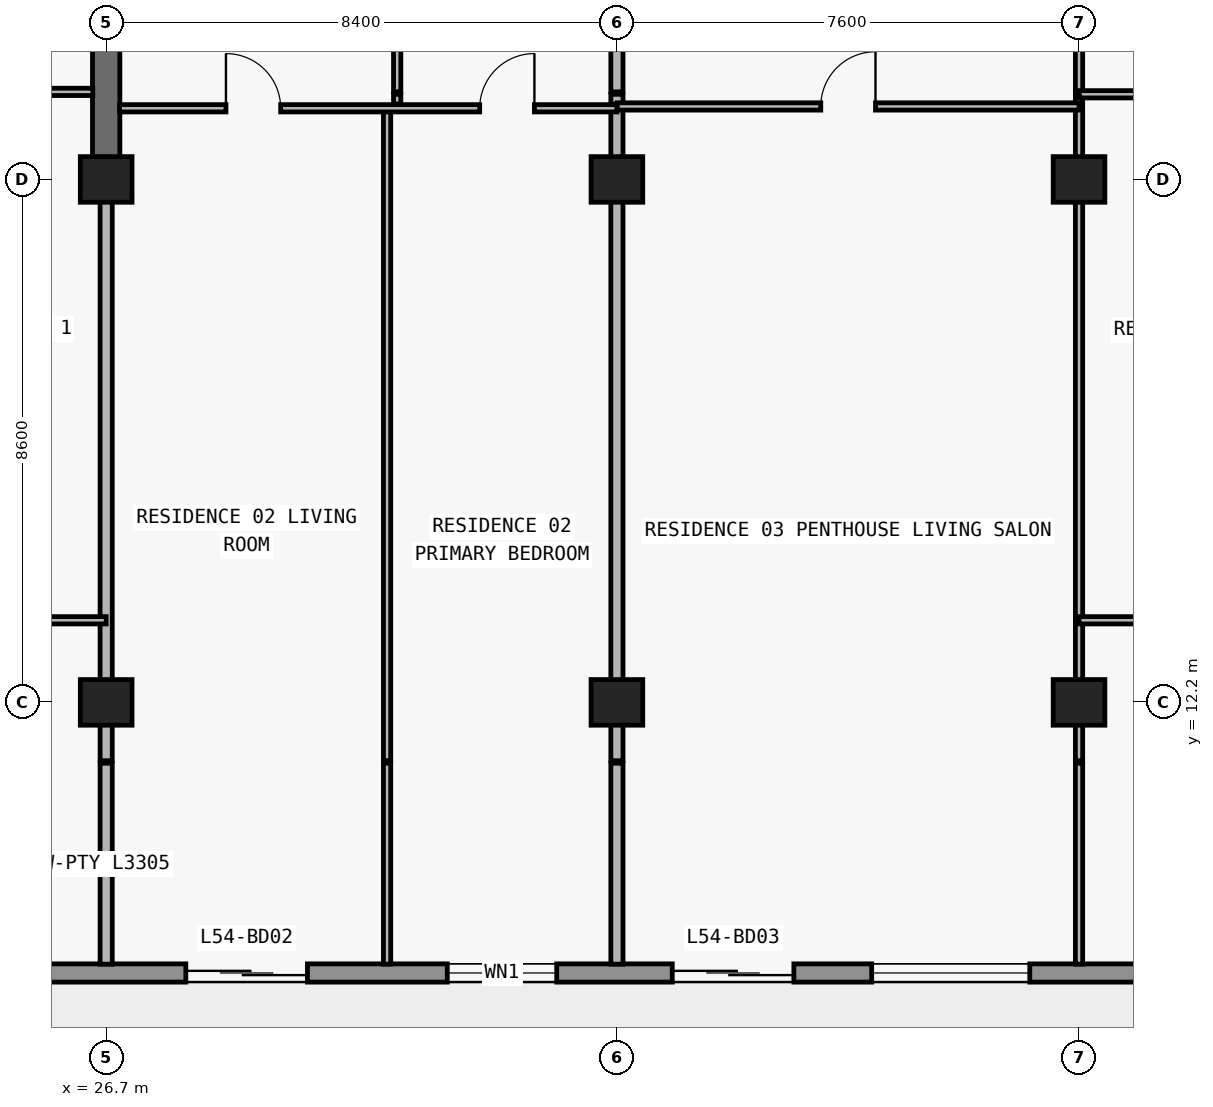
"""IFC4 building model, lengths in metres.
Left out: names, types, materials, properties, quantities, classifications, styles, units other than length and angle.
Written with IfcOpenShell. Run it as: python <this file> out.ifc"""

import sys

from ifc_helpers import new_model, si_unit, direction, frame, frame_2d, origin, origin_2d, place, context, subcontext, project, spatial, rectangle, extrude, element, fill, save


model = new_model("IFC4")
c1 = context("Model", 3, precision=1e-05, world=origin(), true_north=direction((0.0, 1.0)))
c2 = subcontext(c1, "Body", "Model", "MODEL_VIEW")
j1 = project(units=[si_unit("LENGTHUNIT", "METRE"), si_unit("PLANEANGLEUNIT", "RADIAN")], contexts=[c1])
p1 = place(None, origin())
s1 = spatial("IfcSite", under=j1, at=p1, CompositionType="ELEMENT")
p2 = place(p1, origin())
s2 = spatial("IfcBuilding", under=s1, at=p2, CompositionType="ELEMENT")
p3 = place(p2, frame((0.0, 0.0, 195.0)))
s3 = spatial("IfcBuildingStorey", under=s2, at=p3, CompositionType="ELEMENT", Elevation=195.0)
for number, where, z_axis, x_axis in (
    (1, (26.7, 12.2, 0.0), (0.0, 0.0, 1.0), (1.0, 0.0, 0.0)),
    (2, (35.1, 12.2, 0.0), (0.0, 0.0, 1.0), (1.0, 0.0, 0.0)),
    (3, (42.7, 12.2, 0.0), (0.0, 0.0, 1.0), (1.0, 0.0, 0.0)),
    (4, (26.7, 20.8, 0.0), (0.0, 0.0, 1.0), (1.0, 0.0, 0.0)),
    (5, (35.1, 20.8, 0.0), (0.0, 0.0, 1.0), (1.0, 0.0, 0.0)),
    (6, (42.7, 20.8, 0.0), (0.0, 0.0, 1.0), (1.0, 0.0, 0.0)),
):
    element("IfcColumn", number, at=place(p3, frame(where, z_axis=z_axis, x_axis=x_axis)), inside=s3, PredefinedType="COLUMN", context=c2, shape_type="SweptSolid", body=[
        extrude(rectangle(XDim=0.85, YDim=0.75, at=origin_2d()), origin(), (0.0, 0.0, 1.0), 3.05),
    ])
p4 = place(p3, frame((26.7, 20.8, 0.0), z_axis=(0.0, 0.0, 1.0), x_axis=(0.0, 1.0, 0.0)))
e7 = element("IfcWall", 7, at=p4, inside=s3, PredefinedType="SHEAR", context=c2, shape_type="SweptSolid", body=[
    extrude(rectangle(XDim=8.6, YDim=0.45, at=frame_2d((4.3, 0.0))), origin(), (0.0, 0.0, 1.0), 3.05),
])
p5 = place(p3, frame((67.7, 7.75, 0.0), z_axis=(0.0, 0.0, 1.0), x_axis=(-1.0, 0.0, 0.0)))
e8 = element("IfcWall", 8, at=p5, inside=s3, PredefinedType="STANDARD", context=c2, shape_type="SweptSolid", body=[
    extrude(rectangle(XDim=57.6, YDim=0.3, at=frame_2d((28.8, 0.0))), origin(), (0.0, 0.0, 1.0), 3.05),
])
p6 = place(p5, frame((54.69, 0.0, 0.0)))
e9 = element("IfcOpeningElement", 9, at=p6, cuts=e8, PredefinedType="OPENING", context=c2, shape_type="SweptSolid", body=[
    extrude(rectangle(XDim=2.0, YDim=2.3, at=frame_2d((1.0, 1.15))), frame((0.0, 0.16, 0.0), z_axis=(0.0, -1.0, 0.0), x_axis=(1.0, 0.0, 0.0)), (0.0, 0.0, 1.0), 0.32),
])
p7 = place(p5, frame((50.21, 0.0, 0.65)))
e10 = element("IfcOpeningElement", 10, at=p7, cuts=e8, PredefinedType="OPENING", context=c2, shape_type="SweptSolid", body=[
    extrude(rectangle(XDim=2.6, YDim=1.85, at=frame_2d((1.3, 0.925))), frame((0.0, 0.16, 0.0), z_axis=(0.0, -1.0, 0.0), x_axis=(1.0, 0.0, 0.0)), (0.0, 0.0, 1.0), 0.32),
])
p8 = place(p5, frame((44.1, 0.0, 0.85)))
e11 = element("IfcOpeningElement", 11, at=p8, cuts=e8, PredefinedType="OPENING", context=c2, shape_type="SweptSolid", body=[
    extrude(rectangle(XDim=2.2, YDim=1.55, at=frame_2d((1.1, 0.775))), frame((0.0, 0.16, 0.0), z_axis=(0.0, -1.0, 0.0), x_axis=(1.0, 0.0, 0.0)), (0.0, 0.0, 1.0), 0.32),
])
p9 = place(p5, frame((37.69, 0.0, 0.0)))
e12 = element("IfcOpeningElement", 12, at=p9, cuts=e8, PredefinedType="OPENING", context=c2, shape_type="SweptSolid", body=[
    extrude(rectangle(XDim=2.0, YDim=2.3, at=frame_2d((1.0, 1.15))), frame((0.0, 0.16, 0.0), z_axis=(0.0, -1.0, 0.0), x_axis=(1.0, 0.0, 0.0)), (0.0, 0.0, 1.0), 0.32),
])
p10 = place(p5, frame((33.59, 0.0, 0.85)))
e13 = element("IfcOpeningElement", 13, at=p10, cuts=e8, PredefinedType="OPENING", context=c2, shape_type="SweptSolid", body=[
    extrude(rectangle(XDim=1.8, YDim=1.55, at=frame_2d((0.9, 0.775))), frame((0.0, 0.16, 0.0), z_axis=(0.0, -1.0, 0.0), x_axis=(1.0, 0.0, 0.0)), (0.0, 0.0, 1.0), 0.32),
])
p11 = place(p5, frame((29.69, 0.0, 0.0)))
e14 = element("IfcOpeningElement", 14, at=p11, cuts=e8, PredefinedType="OPENING", context=c2, shape_type="SweptSolid", body=[
    extrude(rectangle(XDim=2.0, YDim=2.3, at=frame_2d((1.0, 1.15))), frame((0.0, 0.16, 0.0), z_axis=(0.0, -1.0, 0.0), x_axis=(1.0, 0.0, 0.0)), (0.0, 0.0, 1.0), 0.32),
])
p12 = place(p5, frame((25.81, 0.0, 0.65)))
e15 = element("IfcOpeningElement", 15, at=p12, cuts=e8, PredefinedType="OPENING", context=c2, shape_type="SweptSolid", body=[
    extrude(rectangle(XDim=2.6, YDim=1.85, at=frame_2d((1.3, 0.925))), frame((0.0, 0.16, 0.0), z_axis=(0.0, -1.0, 0.0), x_axis=(1.0, 0.0, 0.0)), (0.0, 0.0, 1.0), 0.32),
])
p13 = place(p5, frame((19.7, 0.0, 0.85)))
e16 = element("IfcOpeningElement", 16, at=p13, cuts=e8, PredefinedType="OPENING", context=c2, shape_type="SweptSolid", body=[
    extrude(rectangle(XDim=2.2, YDim=1.55, at=frame_2d((1.1, 0.775))), frame((0.0, 0.16, 0.0), z_axis=(0.0, -1.0, 0.0), x_axis=(1.0, 0.0, 0.0)), (0.0, 0.0, 1.0), 0.32),
])
p14 = place(p5, frame((13.29, 0.0, 0.0)))
e17 = element("IfcOpeningElement", 17, at=p14, cuts=e8, PredefinedType="OPENING", context=c2, shape_type="SweptSolid", body=[
    extrude(rectangle(XDim=2.0, YDim=2.3, at=frame_2d((1.0, 1.15))), frame((0.0, 0.16, 0.0), z_axis=(0.0, -1.0, 0.0), x_axis=(1.0, 0.0, 0.0)), (0.0, 0.0, 1.0), 0.32),
])
p15 = place(p5, frame((9.19, 0.0, 0.85)))
e18 = element("IfcOpeningElement", 18, at=p15, cuts=e8, PredefinedType="OPENING", context=c2, shape_type="SweptSolid", body=[
    extrude(rectangle(XDim=1.8, YDim=1.55, at=frame_2d((0.9, 0.775))), frame((0.0, 0.16, 0.0), z_axis=(0.0, -1.0, 0.0), x_axis=(1.0, 0.0, 0.0)), (0.0, 0.0, 1.0), 0.32),
])
p16 = place(p5, frame((5.273, 0.0, 0.0)))
e19 = element("IfcOpeningElement", 19, at=p16, cuts=e8, PredefinedType="OPENING", context=c2, shape_type="SweptSolid", body=[
    extrude(rectangle(XDim=2.0, YDim=2.3, at=frame_2d((1.0, 1.15))), frame((0.0, 0.16, 0.0), z_axis=(0.0, -1.0, 0.0), x_axis=(1.0, 0.0, 0.0)), (0.0, 0.0, 1.0), 0.32),
])
p17 = place(p5, frame((1.073, 0.0, 0.85)))
e20 = element("IfcOpeningElement", 20, at=p17, cuts=e8, PredefinedType="OPENING", context=c2, shape_type="SweptSolid", body=[
    extrude(rectangle(XDim=2.2, YDim=1.55, at=frame_2d((1.1, 0.775))), frame((0.0, 0.16, 0.0), z_axis=(0.0, -1.0, 0.0), x_axis=(1.0, 0.0, 0.0)), (0.0, 0.0, 1.0), 0.32),
])
p18 = place(p3, frame((26.7, 7.895, 0.0), z_axis=(0.0, 0.0, 1.0), x_axis=(0.0, 1.0, 0.0)))
e21 = element("IfcWall", 21, at=p18, inside=s3, PredefinedType="PARTITIONING", context=c2, shape_type="SweptSolid", body=[
    extrude(rectangle(XDim=3.305, YDim=0.2, at=frame_2d((1.652, 0.0))), origin(), (0.0, 0.0, 1.0), 3.05),
])
p19 = place(p3, frame((26.7, 11.24, 0.0), z_axis=(0.0, 0.0, 1.0), x_axis=(0.0, 1.0, 0.0)))
e22 = element("IfcWall", 22, at=p19, inside=s3, PredefinedType="PARTITIONING", context=c2, shape_type="SweptSolid", body=[
    extrude(rectangle(XDim=9.555, YDim=0.2, at=frame_2d((4.777, 0.0))), origin(), (0.0, 0.0, 1.0), 2.263),
])
p20 = place(p3, frame((31.32, 7.895, 0.0), z_axis=(0.0, 0.0, 1.0), x_axis=(0.0, 1.0, 0.0)))
e23 = element("IfcWall", 23, at=p20, inside=s3, PredefinedType="PARTITIONING", context=c2, shape_type="SweptSolid", body=[
    extrude(rectangle(XDim=3.305, YDim=0.12, at=frame_2d((1.652, 0.0))), origin(), (0.0, 0.0, 1.0), 3.05),
])
p21 = place(p3, frame((31.32, 11.24, 0.0), z_axis=(0.0, 0.0, 1.0), x_axis=(0.0, 1.0, 0.0)))
e24 = element("IfcWall", 24, at=p21, inside=s3, PredefinedType="PARTITIONING", context=c2, shape_type="SweptSolid", body=[
    extrude(rectangle(XDim=10.73, YDim=0.12, at=frame_2d((5.365, 0.0))), origin(), (0.0, 0.0, 1.0), 3.05),
])
p22 = place(p3, frame((31.486, 22.04, 0.0), z_axis=(0.0, 0.0, 1.0), x_axis=(0.0, 1.0, 0.0)))
e25 = element("IfcWall", 25, at=p22, inside=s3, PredefinedType="PARTITIONING", context=c2, shape_type="SweptSolid", body=[
    extrude(rectangle(XDim=0.16, YDim=0.12, at=frame_2d((0.08, 0.0))), origin(), (0.0, 0.0, 1.0), 3.05),
])
p23 = place(p3, frame((31.486, 22.24, 0.0), z_axis=(0.0, 0.0, 1.0), x_axis=(0.0, 1.0, 0.0)))
e26 = element("IfcWall", 26, at=p23, inside=s3, PredefinedType="PARTITIONING", context=c2, shape_type="SweptSolid", body=[
    extrude(rectangle(XDim=4.36, YDim=0.12, at=frame_2d((2.18, 0.0))), origin(), (0.0, 0.0, 1.0), 3.05),
])
p24 = place(p23, frame((1.73, 0.0, 0.0)))
e27 = element("IfcOpeningElement", 27, at=p24, cuts=e26, PredefinedType="OPENING", context=c2, shape_type="SweptSolid", body=[
    extrude(rectangle(XDim=0.9, YDim=2.15, at=frame_2d((0.45, 1.075))), frame((0.0, 0.07, 0.0), z_axis=(0.0, -1.0, 0.0), x_axis=(1.0, 0.0, 0.0)), (0.0, 0.0, 1.0), 0.14),
])
p25 = place(p3, frame((35.1, 7.895, 0.0), z_axis=(0.0, 0.0, 1.0), x_axis=(0.0, 1.0, 0.0)))
e28 = element("IfcWall", 28, at=p25, inside=s3, PredefinedType="PARTITIONING", context=c2, shape_type="SweptSolid", body=[
    extrude(rectangle(XDim=3.305, YDim=0.2, at=frame_2d((1.652, 0.0))), origin(), (0.0, 0.0, 1.0), 3.05),
])
p26 = place(p3, frame((35.1, 11.24, 0.0), z_axis=(0.0, 0.0, 1.0), x_axis=(0.0, 1.0, 0.0)))
e29 = element("IfcWall", 29, at=p26, inside=s3, PredefinedType="PARTITIONING", context=c2, shape_type="SweptSolid", body=[
    extrude(rectangle(XDim=10.73, YDim=0.2, at=frame_2d((5.365, 0.0))), origin(), (0.0, 0.0, 1.0), 2.263),
])
p27 = place(p3, frame((35.1, 22.04, 0.0), z_axis=(0.0, 0.0, 1.0), x_axis=(0.0, 1.0, 0.0)))
e30 = element("IfcWall", 30, at=p27, inside=s3, PredefinedType="PARTITIONING", context=c2, shape_type="SweptSolid", body=[
    extrude(rectangle(XDim=0.16, YDim=0.2, at=frame_2d((0.08, 0.0))), origin(), (0.0, 0.0, 1.0), 2.263),
])
p28 = place(p3, frame((35.1, 22.24, 0.0), z_axis=(0.0, 0.0, 1.0), x_axis=(0.0, 1.0, 0.0)))
e31 = element("IfcWall", 31, at=p28, inside=s3, PredefinedType="PARTITIONING", context=c2, shape_type="SweptSolid", body=[
    extrude(rectangle(XDim=4.36, YDim=0.2, at=frame_2d((2.18, 0.0))), origin(), (0.0, 0.0, 1.0), 2.263),
])
p29 = place(p3, frame((42.7, 7.895, 0.0), z_axis=(0.0, 0.0, 1.0), x_axis=(0.0, 1.0, 0.0)))
e32 = element("IfcWall", 32, at=p29, inside=s3, PredefinedType="PARTITIONING", context=c2, shape_type="SweptSolid", body=[
    extrude(rectangle(XDim=3.305, YDim=0.12, at=frame_2d((1.652, 0.0))), origin(), (0.0, 0.0, 1.0), 3.05),
])
p30 = place(p3, frame((42.7, 11.24, 0.0), z_axis=(0.0, 0.0, 1.0), x_axis=(0.0, 1.0, 0.0)))
e33 = element("IfcWall", 33, at=p30, inside=s3, PredefinedType="PARTITIONING", context=c2, shape_type="SweptSolid", body=[
    extrude(rectangle(XDim=10.73, YDim=0.12, at=frame_2d((5.365, 0.0))), origin(), (0.0, 0.0, 1.0), 2.263),
])
p31 = place(p3, frame((42.7, 22.04, 0.0), z_axis=(0.0, 0.0, 1.0), x_axis=(0.0, 1.0, 0.0)))
e34 = element("IfcWall", 34, at=p31, inside=s3, PredefinedType="PARTITIONING", context=c2, shape_type="SweptSolid", body=[
    extrude(rectangle(XDim=0.16, YDim=0.12, at=frame_2d((0.08, 0.0))), origin(), (0.0, 0.0, 1.0), 2.263),
])
p32 = place(p3, frame((42.7, 22.24, 0.0), z_axis=(0.0, 0.0, 1.0), x_axis=(0.0, 1.0, 0.0)))
e35 = element("IfcWall", 35, at=p32, inside=s3, PredefinedType="PARTITIONING", context=c2, shape_type="SweptSolid", body=[
    extrude(rectangle(XDim=4.36, YDim=0.12, at=frame_2d((2.18, 0.0))), origin(), (0.0, 0.0, 1.0), 2.263),
])
p33 = place(p32, frame((1.73, 0.0, 0.0)))
e36 = element("IfcOpeningElement", 36, at=p33, cuts=e35, PredefinedType="OPENING", context=c2, shape_type="SweptSolid", body=[
    extrude(rectangle(XDim=0.9, YDim=2.15, at=frame_2d((0.45, 1.075))), frame((0.0, 0.07, 0.0), z_axis=(0.0, -1.0, 0.0), x_axis=(1.0, 0.0, 0.0)), (0.0, 0.0, 1.0), 0.14),
])
p34 = place(p3, frame((18.3, 13.55, 0.0), z_axis=(0.0, 0.0, 1.0), x_axis=(1.0, 0.0, 0.0)))
e37 = element("IfcWall", 37, at=p34, inside=s3, PredefinedType="PARTITIONING", context=c2, shape_type="SweptSolid", body=[
    extrude(rectangle(XDim=8.4, YDim=0.12, at=frame_2d((4.2, 0.0))), origin(), (0.0, 0.0, 1.0), 3.05),
])
p35 = place(p34, frame((3.75, 0.0, 0.0)))
e38 = element("IfcOpeningElement", 38, at=p35, cuts=e37, PredefinedType="OPENING", context=c2, shape_type="SweptSolid", body=[
    extrude(rectangle(XDim=0.9, YDim=2.15, at=frame_2d((0.45, 1.075))), frame((0.0, 0.07, 0.0), z_axis=(0.0, -1.0, 0.0), x_axis=(1.0, 0.0, 0.0)), (0.0, 0.0, 1.0), 0.14),
])
p36 = place(p3, frame((42.7, 13.55, 0.0), z_axis=(0.0, 0.0, 1.0), x_axis=(1.0, 0.0, 0.0)))
e39 = element("IfcWall", 39, at=p36, inside=s3, PredefinedType="PARTITIONING", context=c2, shape_type="SweptSolid", body=[
    extrude(rectangle(XDim=8.4, YDim=0.12, at=frame_2d((4.2, 0.0))), origin(), (0.0, 0.0, 1.0), 3.05),
])
p37 = place(p36, frame((3.75, 0.0, 0.0)))
e40 = element("IfcOpeningElement", 40, at=p37, cuts=e39, PredefinedType="OPENING", context=c2, shape_type="SweptSolid", body=[
    extrude(rectangle(XDim=0.9, YDim=2.15, at=frame_2d((0.45, 1.075))), frame((0.0, 0.07, 0.0), z_axis=(0.0, -1.0, 0.0), x_axis=(1.0, 0.0, 0.0)), (0.0, 0.0, 1.0), 0.14),
])
p38 = place(p3, frame((26.92, 21.97, 0.0), z_axis=(0.0, 0.0, 1.0), x_axis=(1.0, 0.0, 0.0)))
e41 = element("IfcWall", 41, at=p38, inside=s3, PredefinedType="PARTITIONING", context=c2, shape_type="SweptSolid", body=[
    extrude(rectangle(XDim=8.18, YDim=0.12, at=frame_2d((4.09, 0.0))), origin(), (0.0, 0.0, 1.0), 3.05),
])
p39 = place(p38, frame((1.75, 0.0, 0.0)))
e42 = element("IfcOpeningElement", 42, at=p39, cuts=e41, PredefinedType="OPENING", context=c2, shape_type="SweptSolid", body=[
    extrude(rectangle(XDim=0.9, YDim=2.15, at=frame_2d((0.45, 1.075))), frame((0.0, 0.07, 0.0), z_axis=(0.0, -1.0, 0.0), x_axis=(1.0, 0.0, 0.0)), (0.0, 0.0, 1.0), 0.14),
])
p40 = place(p38, frame((5.923, 0.0, 0.0)))
e43 = element("IfcOpeningElement", 43, at=p40, cuts=e41, PredefinedType="OPENING", context=c2, shape_type="SweptSolid", body=[
    extrude(rectangle(XDim=0.9, YDim=2.15, at=frame_2d((0.45, 1.075))), frame((0.0, 0.07, 0.0), z_axis=(0.0, -1.0, 0.0), x_axis=(1.0, 0.0, 0.0)), (0.0, 0.0, 1.0), 0.14),
])
p41 = place(p3, frame((35.105, 22.0, 0.0), z_axis=(0.0, 0.0, 1.0), x_axis=(1.0, 0.0, 0.0)))
e44 = element("IfcWall", 44, at=p41, inside=s3, PredefinedType="PARTITIONING", context=c2, shape_type="SweptSolid", body=[
    extrude(rectangle(XDim=7.595, YDim=0.12, at=frame_2d((3.797, 0.0))), origin(), (0.0, 0.0, 1.0), 3.05),
])
p42 = place(p41, frame((3.347, 0.0, 0.0)))
e45 = element("IfcOpeningElement", 45, at=p42, cuts=e44, PredefinedType="OPENING", context=c2, shape_type="SweptSolid", body=[
    extrude(rectangle(XDim=0.9, YDim=2.15, at=frame_2d((0.45, 1.075))), frame((0.0, 0.07, 0.0), z_axis=(0.0, -1.0, 0.0), x_axis=(1.0, 0.0, 0.0)), (0.0, 0.0, 1.0), 0.14),
])
p43 = place(p3, frame((42.705, 22.2, 0.0), z_axis=(0.0, 0.0, 1.0), x_axis=(1.0, 0.0, 0.0)))
e46 = element("IfcWall", 46, at=p43, inside=s3, PredefinedType="PARTITIONING", context=c2, shape_type="SweptSolid", body=[
    extrude(rectangle(XDim=8.175, YDim=0.12, at=frame_2d((4.087, 0.0))), origin(), (0.0, 0.0, 1.0), 3.05),
])
p44 = place(p43, frame((3.637, 0.0, 0.0)))
e47 = element("IfcOpeningElement", 47, at=p44, cuts=e46, PredefinedType="OPENING", context=c2, shape_type="SweptSolid", body=[
    extrude(rectangle(XDim=0.9, YDim=2.15, at=frame_2d((0.45, 1.075))), frame((0.0, 0.07, 0.0), z_axis=(0.0, -1.0, 0.0), x_axis=(1.0, 0.0, 0.0)), (0.0, 0.0, 1.0), 0.14),
])
p45 = place(p3, frame((18.305, 22.24, 0.0), z_axis=(0.0, 0.0, 1.0), x_axis=(1.0, 0.0, 0.0)))
e48 = element("IfcWall", 48, at=p45, inside=s3, PredefinedType="PARTITIONING", context=c2, shape_type="SweptSolid", body=[
    extrude(rectangle(XDim=8.175, YDim=0.12, at=frame_2d((4.087, 0.0))), origin(), (0.0, 0.0, 1.0), 3.05),
])
p46 = place(p45, frame((3.637, 0.0, 0.0)))
e49 = element("IfcOpeningElement", 49, at=p46, cuts=e48, PredefinedType="OPENING", context=c2, shape_type="SweptSolid", body=[
    extrude(rectangle(XDim=0.9, YDim=2.15, at=frame_2d((0.45, 1.075))), frame((0.0, 0.07, 0.0), z_axis=(0.0, -1.0, 0.0), x_axis=(1.0, 0.0, 0.0)), (0.0, 0.0, 1.0), 0.14),
])
p47 = place(p9, origin())
e50 = element("IfcDoor", 50, at=p47, inside=s3, OperationType="DOUBLE_DOOR_SLIDING", PredefinedType="DOOR", context=c2, shape_type="SweptSolid", body=[
    extrude(rectangle(XDim=2.0, YDim=2.3, at=frame_2d((1.0, 1.15))), frame((0.0, 0.025, 0.0), z_axis=(0.0, -1.0, 0.0), x_axis=(1.0, 0.0, 0.0)), (0.0, 0.0, 1.0), 0.05),
])
fill(e12, e50)
p48 = place(p10, origin())
e51 = element("IfcWindow", 51, at=p48, inside=s3, PartitioningType="SINGLE_PANEL", PredefinedType="WINDOW", context=c2, shape_type="SweptSolid", body=[
    extrude(rectangle(XDim=1.8, YDim=1.55, at=frame_2d((0.9, 0.775))), frame((0.0, 0.03, 0.0), z_axis=(0.0, -1.0, 0.0), x_axis=(1.0, 0.0, 0.0)), (0.0, 0.0, 1.0), 0.06),
])
fill(e13, e51)
p49 = place(p11, origin())
e52 = element("IfcDoor", 52, at=p49, inside=s3, OperationType="DOUBLE_DOOR_SLIDING", PredefinedType="DOOR", context=c2, shape_type="SweptSolid", body=[
    extrude(rectangle(XDim=2.0, YDim=2.3, at=frame_2d((1.0, 1.15))), frame((0.0, 0.025, 0.0), z_axis=(0.0, -1.0, 0.0), x_axis=(1.0, 0.0, 0.0)), (0.0, 0.0, 1.0), 0.05),
])
fill(e14, e52)
p50 = place(p12, origin())
e53 = element("IfcWindow", 53, at=p50, inside=s3, PartitioningType="SINGLE_PANEL", PredefinedType="WINDOW", context=c2, shape_type="SweptSolid", body=[
    extrude(rectangle(XDim=2.6, YDim=1.85, at=frame_2d((1.3, 0.925))), frame((0.0, 0.03, 0.0), z_axis=(0.0, -1.0, 0.0), x_axis=(1.0, 0.0, 0.0)), (0.0, 0.0, 1.0), 0.06),
])
fill(e15, e53)
p51 = place(p39, origin())
e54 = element("IfcDoor", 54, at=p51, inside=s3, OperationType="SINGLE_SWING_LEFT", PredefinedType="DOOR", context=c2, shape_type="SweptSolid", body=[
    extrude(rectangle(XDim=0.9, YDim=2.15, at=frame_2d((0.45, 1.075))), frame((0.0, 0.025, 0.0), z_axis=(0.0, -1.0, 0.0), x_axis=(1.0, 0.0, 0.0)), (0.0, 0.0, 1.0), 0.05),
])
fill(e42, e54)
p52 = place(p40, origin())
e55 = element("IfcDoor", 55, at=p52, inside=s3, OperationType="SINGLE_SWING_RIGHT", PredefinedType="DOOR", context=c2, shape_type="SweptSolid", body=[
    extrude(rectangle(XDim=0.9, YDim=2.15, at=frame_2d((0.45, 1.075))), frame((0.0, 0.025, 0.0), z_axis=(0.0, -1.0, 0.0), x_axis=(1.0, 0.0, 0.0)), (0.0, 0.0, 1.0), 0.05),
])
fill(e43, e55)
p53 = place(p42, origin())
e56 = element("IfcDoor", 56, at=p53, inside=s3, OperationType="SINGLE_SWING_RIGHT", PredefinedType="DOOR", context=c2, shape_type="SweptSolid", body=[
    extrude(rectangle(XDim=0.9, YDim=2.15, at=frame_2d((0.45, 1.075))), frame((0.0, 0.025, 0.0), z_axis=(0.0, -1.0, 0.0), x_axis=(1.0, 0.0, 0.0)), (0.0, 0.0, 1.0), 0.05),
])
fill(e45, e56)
save(model, sys.argv[1])
